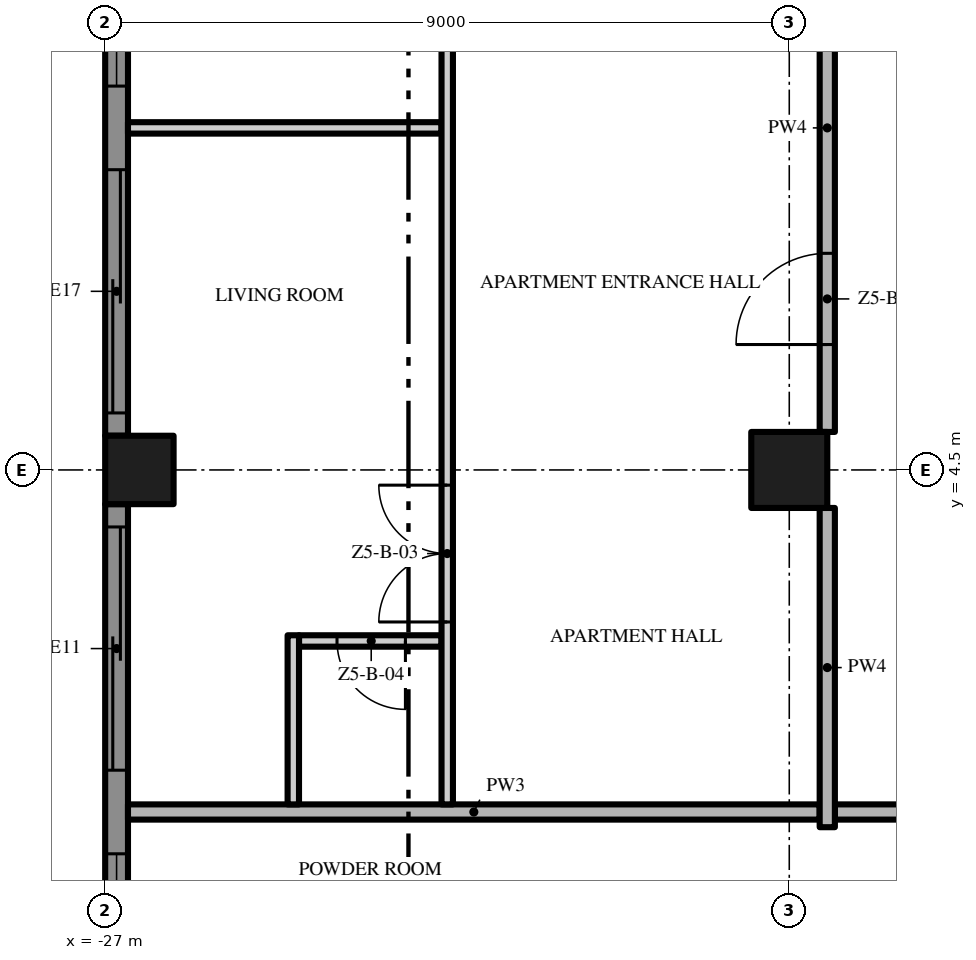
"""IFC4 building model, lengths in metres.
Left out: names, types, materials, properties, quantities, classifications, styles, units other than length and angle.
Written with IfcOpenShell. Run it as: python <this file> out.ifc"""

import sys

from ifc_helpers import new_model, si_unit, direction, frame, frame_2d, origin, origin_2d, place, context, subcontext, project, spatial, polyline, rectangle, outline, extrude, element, fill, save


model = new_model("IFC4")
c1 = context("Model", 3, precision=1e-05, world=origin(), true_north=direction((0.0, 1.0)))
c2 = subcontext(c1, "Body", "Model", "MODEL_VIEW")
j1 = project(units=[si_unit("LENGTHUNIT", "METRE"), si_unit("PLANEANGLEUNIT", "RADIAN")], contexts=[c1])
p1 = place(None, origin())
s1 = spatial("IfcSite", under=j1, at=p1, CompositionType="ELEMENT")
p2 = place(p1, origin())
s2 = spatial("IfcBuilding", under=s1, at=p2, CompositionType="ELEMENT")
p3 = place(p2, frame((0.0, 0.0, 254.0)))
s3 = spatial("IfcBuildingStorey", under=s2, at=p3, CompositionType="ELEMENT", Elevation=254.0)
p4 = place(p3, frame((-18.0, 4.5, 0.0), z_axis=(0.0, 0.0, 1.0), x_axis=(1.0, 0.0, 0.0)))
e1 = element("IfcColumn", 1, at=p4, inside=s3, PredefinedType="COLUMN", context=c2, shape_type="SweptSolid", body=[
    extrude(rectangle(XDim=1.0, YDim=1.0, at=origin_2d()), origin(), (0.0, 0.0, 1.0), 3.5),
])
p5 = place(p3, frame((-26.55, 4.5, 0.0), z_axis=(0.0, 0.0, 1.0), x_axis=(1.0, 0.0, 0.0)))
e2 = element("IfcColumn", 2, at=p5, inside=s3, PredefinedType="COLUMN", context=c2, shape_type="SweptSolid", body=[
    extrude(rectangle(XDim=0.9, YDim=0.9, at=origin_2d()), origin(), (0.0, 0.0, 1.0), 3.5),
])
p6 = place(p3, frame((-26.85, 4.95, 0.0), z_axis=(0.0, 0.0, 1.0), x_axis=(0.0, 1.0, 0.0)))
e3 = element("IfcWall", 3, at=p6, inside=s3, PredefinedType="SOLIDWALL", context=c2, shape_type="SweptSolid", body=[
    extrude(rectangle(XDim=8.1, YDim=0.3, at=frame_2d((4.05, 0.0))), origin(), (0.0, 0.0, 1.0), 3.5),
])
p7 = place(p6, frame((4.6, 0.0, 0.45)))
e4 = element("IfcOpeningElement", 4, at=p7, cuts=e3, PredefinedType="OPENING", context=c2, shape_type="SweptSolid", body=[
    extrude(rectangle(XDim=3.2, YDim=2.65, at=frame_2d((1.6, 1.325))), frame((0.0, 0.16, 0.0), z_axis=(0.0, -1.0, 0.0), x_axis=(1.0, 0.0, 0.0)), (0.0, 0.0, 1.0), 0.32),
])
p8 = place(p6, frame((0.3, 0.0, 0.0)))
e5 = element("IfcOpeningElement", 5, at=p8, cuts=e3, PredefinedType="OPENING", context=c2, shape_type="SweptSolid", body=[
    extrude(rectangle(XDim=3.2, YDim=2.4, at=frame_2d((1.6, 1.2))), frame((0.0, 0.16, 0.0), z_axis=(0.0, -1.0, 0.0), x_axis=(1.0, 0.0, 0.0)), (0.0, 0.0, 1.0), 0.32),
])
p9 = place(p3, frame((-26.85, -4.05, 0.0), z_axis=(0.0, 0.0, 1.0), x_axis=(0.0, 1.0, 0.0)))
e6 = element("IfcWall", 6, at=p9, inside=s3, PredefinedType="SOLIDWALL", context=c2, shape_type="SweptSolid", body=[
    extrude(rectangle(XDim=8.1, YDim=0.3, at=frame_2d((4.05, 0.0))), origin(), (0.0, 0.0, 1.0), 3.5),
])
p10 = place(p9, frame((4.6, 0.0, 0.0)))
e7 = element("IfcOpeningElement", 7, at=p10, cuts=e6, PredefinedType="OPENING", context=c2, shape_type="SweptSolid", body=[
    extrude(rectangle(XDim=3.2, YDim=2.4, at=frame_2d((1.6, 1.2))), frame((0.0, 0.16, 0.0), z_axis=(0.0, -1.0, 0.0), x_axis=(1.0, 0.0, 0.0)), (0.0, 0.0, 1.0), 0.32),
])
p11 = place(p9, frame((0.3, 0.0, 0.45)))
e8 = element("IfcOpeningElement", 8, at=p11, cuts=e6, PredefinedType="OPENING", context=c2, shape_type="SweptSolid", body=[
    extrude(rectangle(XDim=3.2, YDim=2.65, at=frame_2d((1.6, 1.325))), frame((0.0, 0.16, 0.0), z_axis=(0.0, -1.0, 0.0), x_axis=(1.0, 0.0, 0.0)), (0.0, 0.0, 1.0), 0.32),
])
p12 = place(p3, origin())
e9 = element("IfcWall", 9, at=p12, inside=s3, PredefinedType="USERDEFINED", context=c2, shape_type="SweptSolid", body=[
    extrude(outline(polyline([(-29.649, 18.0), (-28.988, 16.5), (-28.255, 15.0), (-27.731, 13.5), (-27.6, 12.375), (-27.615, 12.0), (-27.951, 10.5), (-28.612, 9.0), (-29.345, 7.5), (-29.869, 6.0), (-30.0, 4.875), (-29.985, 4.5), (-29.649, 3.0), (-28.988, 1.5), (-28.255, 0.0), (-27.731, -1.5), (-27.6, -2.625), (-27.615, -3.0), (-27.951, -4.5), (-28.612, -6.0), (-29.345, -7.5), (-29.869, -9.0), (-30.0, -10.125), (-29.985, -10.5), (-29.649, -12.0), (-28.988, -13.5), (-28.255, -15.0), (-27.731, -16.5), (-27.6, -17.625), (-27.615, -18.0), (-27.365, -18.01), (-27.349, -17.615), (-27.486, -16.444), (-28.024, -14.904), (-28.761, -13.395), (-29.41, -11.921), (-29.736, -10.467), (-29.749, -10.135), (-29.624, -9.056), (-29.114, -7.596), (-28.385, -6.105), (-27.713, -4.579), (-27.366, -3.033), (-27.349, -2.615), (-27.486, -1.444), (-28.024, 0.096), (-28.761, 1.605), (-29.41, 3.079), (-29.736, 4.533), (-29.749, 4.865), (-29.624, 5.944), (-29.114, 7.404), (-28.385, 8.895), (-27.713, 10.421), (-27.366, 11.967), (-27.349, 12.385), (-27.486, 13.556), (-28.024, 15.096), (-28.761, 16.605), (-29.42, 18.101), (-29.649, 18.0)])), origin(), (0.0, 0.0, 1.0), 0.9),
])
p13 = place(p3, frame((17.4, 0.0, 0.0), z_axis=(0.0, 0.0, 1.0), x_axis=(-1.0, 0.0, 0.0)))
e10 = element("IfcWall", 10, at=p13, inside=s3, PredefinedType="PARTITIONING", context=c2, shape_type="SweptSolid", body=[
    extrude(rectangle(XDim=34.8, YDim=0.2, at=frame_2d((17.4, 0.0))), origin(), (0.0, 0.0, 1.0), 3.5),
])
p14 = place(p13, frame((23.4, 0.0, 0.0)))
e11 = element("IfcOpeningElement", 11, at=p14, cuts=e10, PredefinedType="OPENING", context=c2, shape_type="SweptSolid", body=[
    extrude(rectangle(XDim=1.5, YDim=2.4, at=frame_2d((0.75, 1.2))), frame((0.0, 0.11, 0.0), z_axis=(0.0, -1.0, 0.0), x_axis=(1.0, 0.0, 0.0)), (0.0, 0.0, 1.0), 0.22),
])
p15 = place(p13, frame((5.4, 0.0, 0.0)))
e12 = element("IfcOpeningElement", 12, at=p15, cuts=e10, PredefinedType="OPENING", context=c2, shape_type="SweptSolid", body=[
    extrude(rectangle(XDim=1.5, YDim=2.4, at=frame_2d((0.75, 1.2))), frame((0.0, 0.11, 0.0), z_axis=(0.0, -1.0, 0.0), x_axis=(1.0, 0.0, 0.0)), (0.0, 0.0, 1.0), 0.22),
])
p16 = place(p3, frame((-26.7, 0.0, 0.0), z_axis=(0.0, 0.0, 1.0), x_axis=(1.0, 0.0, 0.0)))
e13 = element("IfcWall", 13, at=p16, inside=s3, PredefinedType="PARTITIONING", context=c2, shape_type="SweptSolid", body=[
    extrude(rectangle(XDim=9.1, YDim=0.2, at=frame_2d((4.55, 0.0))), origin(), (0.0, 0.0, 1.0), 3.5),
])
p17 = place(p3, frame((-22.575, 2.25, 0.0), z_axis=(0.0, 0.0, 1.0), x_axis=(-1.0, 0.0, 0.0)))
e14 = element("IfcWall", 14, at=p17, inside=s3, PredefinedType="PARTITIONING", context=c2, shape_type="SweptSolid", body=[
    extrude(rectangle(XDim=1.875, YDim=0.15, at=frame_2d((0.938, 0.0))), origin(), (0.0, 0.0, 1.0), 3.5),
])
p18 = place(p17, frame((0.475, 0.0, 0.0)))
e15 = element("IfcOpeningElement", 15, at=p18, cuts=e14, PredefinedType="OPENING", context=c2, shape_type="SweptSolid", body=[
    extrude(rectangle(XDim=0.9, YDim=2.1, at=frame_2d((0.45, 1.05))), frame((0.0, 0.085, 0.0), z_axis=(0.0, -1.0, 0.0), x_axis=(1.0, 0.0, 0.0)), (0.0, 0.0, 1.0), 0.17),
])
p19 = place(p3, frame((-26.7, 9.0, 0.0), z_axis=(0.0, 0.0, 1.0), x_axis=(1.0, 0.0, 0.0)))
e16 = element("IfcWall", 16, at=p19, inside=s3, PredefinedType="PARTITIONING", context=c2, shape_type="SweptSolid", body=[
    extrude(rectangle(XDim=4.125, YDim=0.15, at=frame_2d((2.062, 0.0))), origin(), (0.0, 0.0, 1.0), 3.5),
])
p20 = place(p3, frame((-24.525, 0.1, 0.0), z_axis=(0.0, 0.0, 1.0), x_axis=(0.0, 1.0, 0.0)))
e17 = element("IfcWall", 17, at=p20, inside=s3, PredefinedType="PARTITIONING", context=c2, shape_type="SweptSolid", body=[
    extrude(rectangle(XDim=2.225, YDim=0.15, at=frame_2d((1.113, 0.0))), origin(), (0.0, 0.0, 1.0), 3.5),
])
p21 = place(p3, frame((-22.5, 0.1, 0.0), z_axis=(0.0, 0.0, 1.0), x_axis=(0.0, 1.0, 0.0)))
e18 = element("IfcWall", 18, at=p21, inside=s3, PredefinedType="PARTITIONING", context=c2, shape_type="SweptSolid", body=[
    extrude(rectangle(XDim=17.45, YDim=0.15, at=frame_2d((8.725, 0.0))), origin(), (0.0, 0.0, 1.0), 3.5),
])
p22 = place(p21, frame((2.4, 0.0, 0.0)))
e19 = element("IfcOpeningElement", 19, at=p22, cuts=e18, PredefinedType="OPENING", context=c2, shape_type="SweptSolid", body=[
    extrude(rectangle(XDim=1.8, YDim=2.4, at=frame_2d((0.9, 1.2))), frame((0.0, 0.085, 0.0), z_axis=(0.0, -1.0, 0.0), x_axis=(1.0, 0.0, 0.0)), (0.0, 0.0, 1.0), 0.17),
])
p23 = place(p21, frame((10.65, 0.0, 0.0)))
e20 = element("IfcOpeningElement", 20, at=p23, cuts=e18, PredefinedType="OPENING", context=c2, shape_type="SweptSolid", body=[
    extrude(rectangle(XDim=1.0, YDim=2.4, at=frame_2d((0.5, 1.2))), frame((0.0, 0.085, 0.0), z_axis=(0.0, -1.0, 0.0), x_axis=(1.0, 0.0, 0.0)), (0.0, 0.0, 1.0), 0.17),
])
p24 = place(p3, frame((-17.5, -0.2, 0.0), z_axis=(0.0, 0.0, 1.0), x_axis=(0.0, 1.0, 0.0)))
e21 = element("IfcWall", 21, at=p24, inside=s3, PredefinedType="PARTITIONING", context=c2, shape_type="SweptSolid", body=[
    extrude(rectangle(XDim=4.2, YDim=0.2, at=frame_2d((2.1, 0.0))), origin(), (0.0, 0.0, 1.0), 3.5),
])
p25 = place(p3, frame((-17.5, 5.0, 0.0), z_axis=(0.0, 0.0, 1.0), x_axis=(0.0, 1.0, 0.0)))
e22 = element("IfcWall", 22, at=p25, inside=s3, PredefinedType="PARTITIONING", context=c2, shape_type="SweptSolid", body=[
    extrude(rectangle(XDim=8.0, YDim=0.2, at=frame_2d((4.0, 0.0))), origin(), (0.0, 0.0, 1.0), 3.5),
])
p26 = place(p25, frame((1.15, 0.0, 0.0)))
e23 = element("IfcOpeningElement", 23, at=p26, cuts=e22, PredefinedType="OPENING", context=c2, shape_type="SweptSolid", body=[
    extrude(rectangle(XDim=1.2, YDim=2.4, at=frame_2d((0.6, 1.2))), frame((0.0, 0.11, 0.0), z_axis=(0.0, -1.0, 0.0), x_axis=(1.0, 0.0, 0.0)), (0.0, 0.0, 1.0), 0.22),
])
p27 = place(p7, origin())
e24 = element("IfcWindow", 24, at=p27, inside=s3, PartitioningType="SINGLE_PANEL", PredefinedType="WINDOW", context=c2, shape_type="SweptSolid", body=[
    extrude(rectangle(XDim=3.2, YDim=2.65, at=frame_2d((1.6, 1.325))), frame((0.0, 0.03, 0.0), z_axis=(0.0, -1.0, 0.0), x_axis=(1.0, 0.0, 0.0)), (0.0, 0.0, 1.0), 0.06),
])
fill(e4, e24)
p28 = place(p8, origin())
e25 = element("IfcDoor", 25, at=p28, inside=s3, OperationType="SINGLE_SWING_LEFT", PredefinedType="DOOR", context=c2, shape_type="SweptSolid", body=[
    extrude(rectangle(XDim=3.2, YDim=2.4, at=frame_2d((1.6, 1.2))), frame((0.0, 0.025, 0.0), z_axis=(0.0, -1.0, 0.0), x_axis=(1.0, 0.0, 0.0)), (0.0, 0.0, 1.0), 0.05),
])
fill(e5, e25)
p29 = place(p10, origin())
e26 = element("IfcDoor", 26, at=p29, inside=s3, OperationType="SINGLE_SWING_LEFT", PredefinedType="DOOR", context=c2, shape_type="SweptSolid", body=[
    extrude(rectangle(XDim=3.2, YDim=2.4, at=frame_2d((1.6, 1.2))), frame((0.0, 0.025, 0.0), z_axis=(0.0, -1.0, 0.0), x_axis=(1.0, 0.0, 0.0)), (0.0, 0.0, 1.0), 0.05),
])
fill(e7, e26)
p30 = place(p11, origin())
e27 = element("IfcWindow", 27, at=p30, inside=s3, PartitioningType="SINGLE_PANEL", PredefinedType="WINDOW", context=c2, shape_type="SweptSolid", body=[
    extrude(rectangle(XDim=3.2, YDim=2.65, at=frame_2d((1.6, 1.325))), frame((0.0, 0.03, 0.0), z_axis=(0.0, -1.0, 0.0), x_axis=(1.0, 0.0, 0.0)), (0.0, 0.0, 1.0), 0.06),
])
fill(e8, e27)
p31 = place(p26, origin())
e28 = element("IfcDoor", 28, at=p31, inside=s3, OperationType="SINGLE_SWING_LEFT", PredefinedType="DOOR", context=c2, shape_type="SweptSolid", body=[
    extrude(rectangle(XDim=1.2, YDim=2.4, at=frame_2d((0.6, 1.2))), frame((0.0, 0.025, 0.0), z_axis=(0.0, -1.0, 0.0), x_axis=(1.0, 0.0, 0.0)), (0.0, 0.0, 1.0), 0.05),
])
fill(e23, e28)
p32 = place(p22, origin())
e29 = element("IfcDoor", 29, at=p32, inside=s3, OperationType="DOUBLE_DOOR_SINGLE_SWING", PredefinedType="DOOR", context=c2, shape_type="SweptSolid", body=[
    extrude(rectangle(XDim=1.8, YDim=2.4, at=frame_2d((0.9, 1.2))), frame((0.0, 0.025, 0.0), z_axis=(0.0, -1.0, 0.0), x_axis=(1.0, 0.0, 0.0)), (0.0, 0.0, 1.0), 0.05),
])
fill(e19, e29)
p33 = place(p18, origin())
e30 = element("IfcDoor", 30, at=p33, inside=s3, OperationType="SINGLE_SWING_LEFT", PredefinedType="DOOR", context=c2, shape_type="SweptSolid", body=[
    extrude(rectangle(XDim=0.9, YDim=2.1, at=frame_2d((0.45, 1.05))), frame((0.0, 0.025, 0.0), z_axis=(0.0, -1.0, 0.0), x_axis=(1.0, 0.0, 0.0)), (0.0, 0.0, 1.0), 0.05),
])
fill(e15, e30)
save(model, sys.argv[1])
